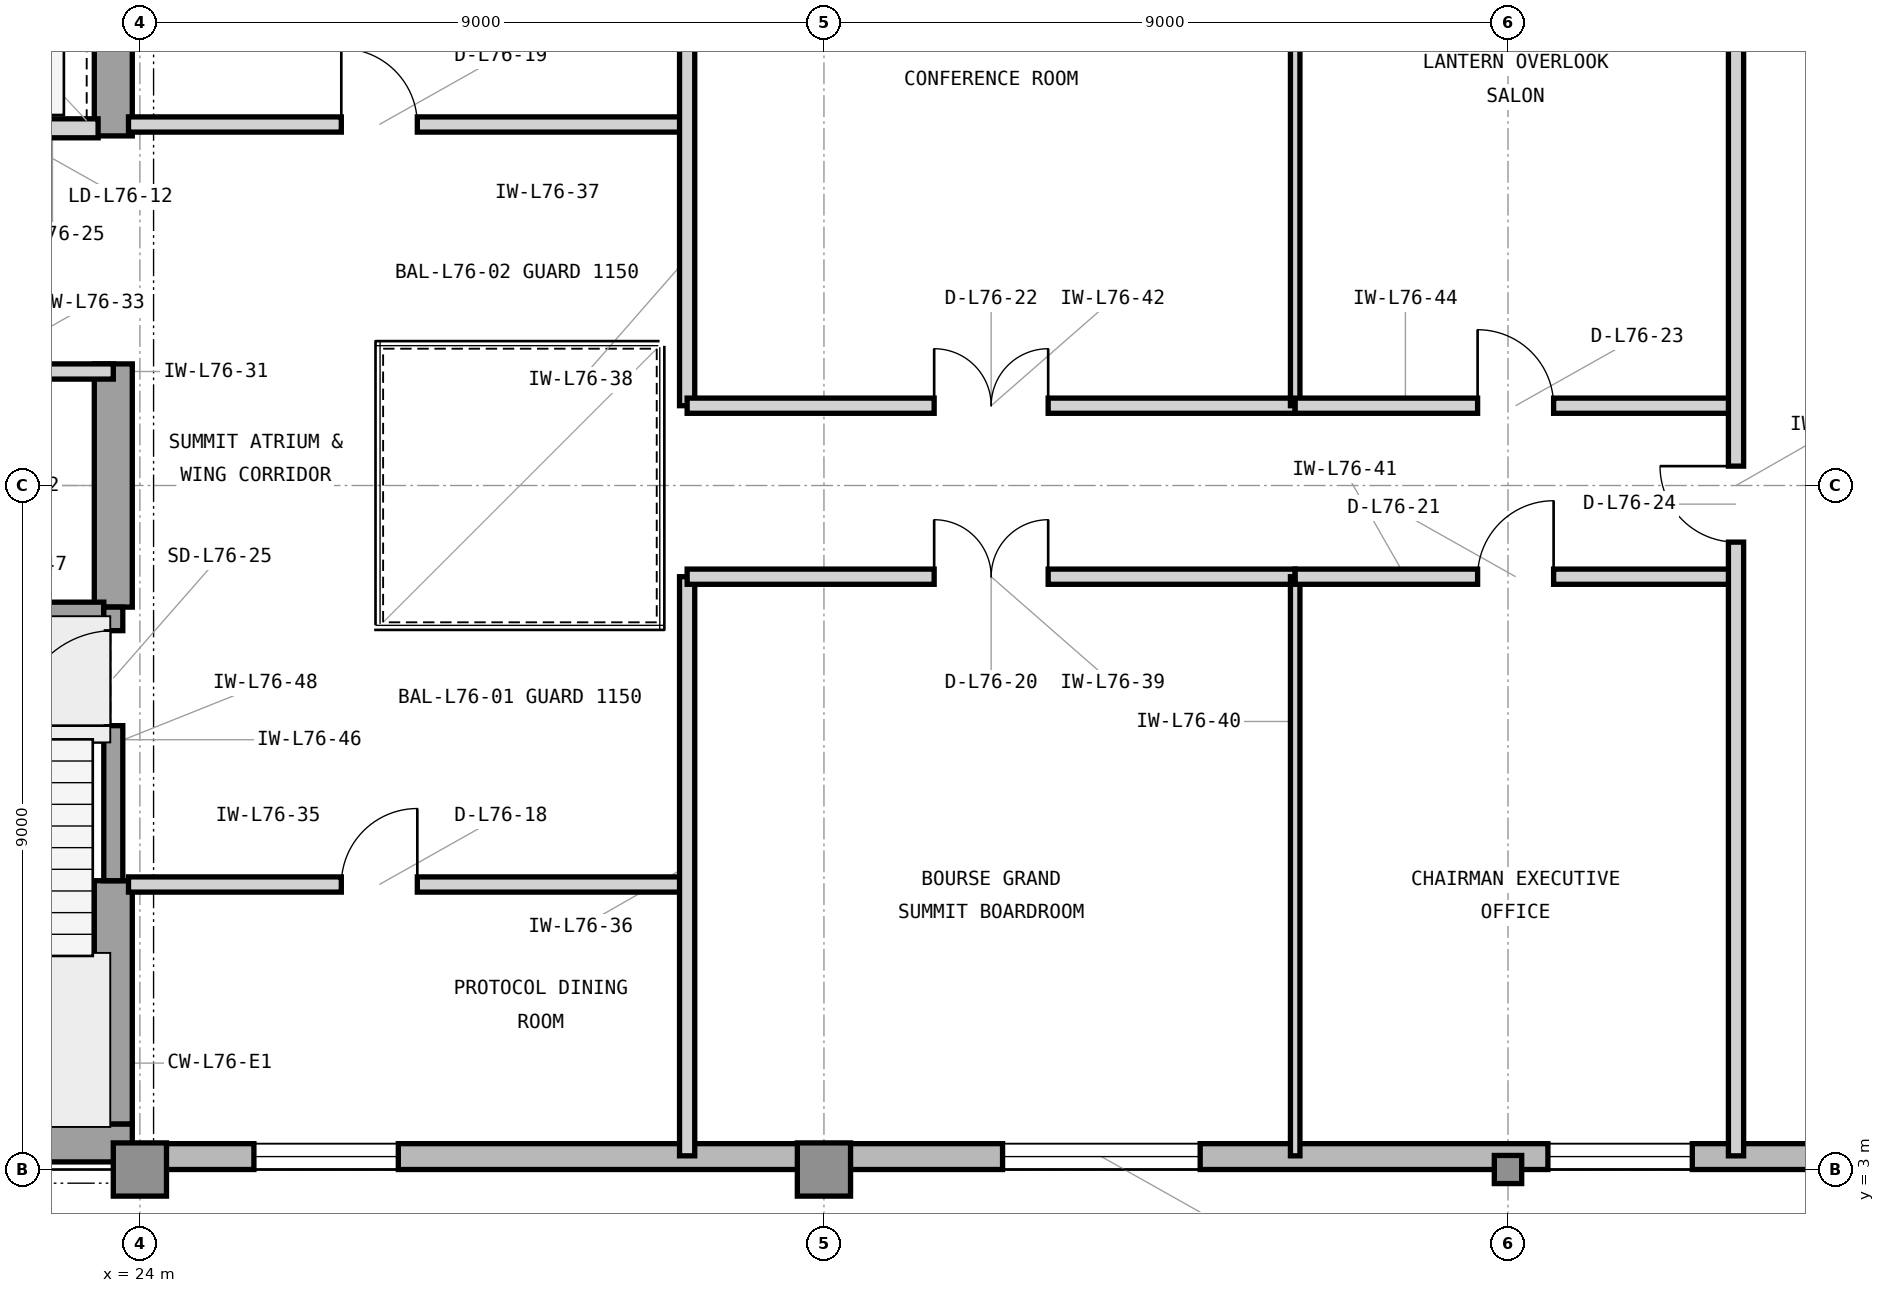
"""IFC4 building model, lengths in metres.
Left out: names, types, materials, properties, quantities, classifications, styles, units other than length and angle.
Written with IfcOpenShell. Run it as: python <this file> out.ifc"""

import sys

from ifc_helpers import new_model, si_unit, direction, frame, frame_2d, origin, origin_2d, place, context, subcontext, project, spatial, rectangle, i_section, extrude, element, fill, save


model = new_model("IFC4")
c1 = context("Model", 3, precision=1e-05, world=origin(), true_north=direction((0.0, 1.0)))
c2 = subcontext(c1, "Body", "Model", "MODEL_VIEW")
j1 = project(units=[si_unit("LENGTHUNIT", "METRE"), si_unit("PLANEANGLEUNIT", "RADIAN")], contexts=[c1])
p1 = place(None, origin())
s1 = spatial("IfcSite", under=j1, at=p1, CompositionType="ELEMENT")
p2 = place(p1, origin())
s2 = spatial("IfcBuilding", under=s1, at=p2, CompositionType="ELEMENT")
p3 = place(p2, frame((0.0, 0.0, 309.3)))
s3 = spatial("IfcBuildingStorey", under=s2, at=p3, CompositionType="ELEMENT", Elevation=309.3)
p4 = place(p3, frame((7.475, 3.35, 0.0), z_axis=(0.0, 0.0, 1.0), x_axis=(1.0, 0.0, 0.0)))
e1 = element("IfcWall", 1, at=p4, inside=s3, PredefinedType="SHEAR", context=c2, shape_type="SweptSolid", body=[
    extrude(rectangle(XDim=16.425, YDim=0.5, at=frame_2d((8.212, 0.0))), origin(), (0.0, 0.0, 1.0), 3.9),
])
p5 = place(p3, frame((23.65, 3.6, 0.0), z_axis=(0.0, 0.0, 1.0), x_axis=(0.0, 1.0, 0.0)))
e2 = element("IfcWall", 2, at=p5, inside=s3, PredefinedType="SHEAR", context=c2, shape_type="SweptSolid", body=[
    extrude(rectangle(XDim=3.2, YDim=0.5, at=frame_2d((1.6, 0.0))), origin(), (0.0, 0.0, 1.0), 3.9),
])
p6 = place(p3, frame((23.65, 10.4, 0.0), z_axis=(0.0, 0.0, 1.0), x_axis=(0.0, 1.0, 0.0)))
e3 = element("IfcWall", 3, at=p6, inside=s3, PredefinedType="SHEAR", context=c2, shape_type="SweptSolid", body=[
    extrude(rectangle(XDim=3.2, YDim=0.5, at=frame_2d((1.6, 0.0))), origin(), (0.0, 0.0, 1.0), 3.9),
])
p7 = place(p3, frame((23.65, 16.6, 0.0), z_axis=(0.0, 0.0, 1.0), x_axis=(0.0, 1.0, 0.0)))
e4 = element("IfcWall", 4, at=p7, inside=s3, PredefinedType="SHEAR", context=c2, shape_type="SweptSolid", body=[
    extrude(rectangle(XDim=4.05, YDim=0.5, at=frame_2d((2.025, 0.0))), origin(), (0.0, 0.0, 1.0), 3.9),
])
for number, where, z_axis, x_axis in (
    (5, (24.0, 3.0, 0.0), (0.0, 0.0, 1.0), (1.0, 0.0, 0.0)),
    (6, (33.0, 3.0, 0.0), (0.0, 0.0, 1.0), (1.0, 0.0, 0.0)),
):
    element("IfcColumn", number, at=place(p3, frame(where, z_axis=z_axis, x_axis=x_axis)), inside=s3, PredefinedType="COLUMN", context=c2, shape_type="SweptSolid", body=[
        extrude(rectangle(XDim=0.7, YDim=0.7, at=origin_2d()), origin(), (0.0, 0.0, 1.0), 3.9),
    ])
p8 = place(p3, frame((42.0, 3.0, 0.0), z_axis=(0.0, 0.0, 1.0), x_axis=(1.0, 0.0, 0.0)))
e7 = element("IfcColumn", 7, at=p8, inside=s3, PredefinedType="COLUMN", context=c2, shape_type="SweptSolid", body=[
    extrude(i_section(OverallWidth=0.37, OverallDepth=0.36, WebThickness=0.012, FlangeThickness=0.02, FilletRadius=0.016, at=origin_2d()), origin(), (0.0, 0.0, 1.0), 3.9),
])
p9 = place(p3, frame((23.9, 3.17, 0.0), z_axis=(0.0, 0.0, 1.0), x_axis=(1.0, 0.0, 0.0)))
e8 = element("IfcWall", 8, at=p9, inside=s3, PredefinedType="STANDARD", context=c2, shape_type="SweptSolid", body=[
    extrude(rectangle(XDim=25.5, YDim=0.34, at=frame_2d((12.75, 0.0))), origin(), (0.0, 0.0, 1.0), 3.62),
])
p10 = place(p9, frame((1.6, 0.0, 0.8)))
e9 = element("IfcOpeningElement", 9, at=p10, cuts=e8, PredefinedType="OPENING", context=c2, shape_type="SweptSolid", body=[
    extrude(rectangle(XDim=1.9, YDim=2.35, at=frame_2d((0.95, 1.175))), frame((0.0, 0.18, 0.0), z_axis=(0.0, -1.0, 0.0), x_axis=(1.0, 0.0, 0.0)), (0.0, 0.0, 1.0), 0.36),
])
p11 = place(p9, frame((11.45, 0.0, 0.8)))
e10 = element("IfcOpeningElement", 10, at=p11, cuts=e8, PredefinedType="OPENING", context=c2, shape_type="SweptSolid", body=[
    extrude(rectangle(XDim=2.6, YDim=2.35, at=frame_2d((1.3, 1.175))), frame((0.0, 0.18, 0.0), z_axis=(0.0, -1.0, 0.0), x_axis=(1.0, 0.0, 0.0)), (0.0, 0.0, 1.0), 0.36),
])
p12 = place(p9, frame((18.625, 0.0, 0.8)))
e11 = element("IfcOpeningElement", 11, at=p12, cuts=e8, PredefinedType="OPENING", context=c2, shape_type="SweptSolid", body=[
    extrude(rectangle(XDim=1.9, YDim=2.35, at=frame_2d((0.95, 1.175))), frame((0.0, 0.18, 0.0), z_axis=(0.0, -1.0, 0.0), x_axis=(1.0, 0.0, 0.0)), (0.0, 0.0, 1.0), 0.36),
])
p13 = place(p3, frame((21.05, 16.7, 0.0), z_axis=(0.0, 0.0, 1.0), x_axis=(1.0, 0.0, 0.0)))
e12 = element("IfcWall", 12, at=p13, inside=s3, PredefinedType="PARTITIONING", context=c2, shape_type="SweptSolid", body=[
    extrude(rectangle(XDim=2.4, YDim=0.25, at=frame_2d((1.2, 0.0))), origin(), (0.0, 0.0, 1.0), 3.203),
])
p14 = place(p13, frame((0.52, 0.0, 0.0)))
e13 = element("IfcOpeningElement", 13, at=p14, cuts=e12, PredefinedType="OPENING", context=c2, shape_type="SweptSolid", body=[
    extrude(rectangle(XDim=1.15, YDim=2.25, at=frame_2d((0.575, 1.125))), frame((0.0, 0.135, 0.0), z_axis=(0.0, -1.0, 0.0), x_axis=(1.0, 0.0, 0.0)), (0.0, 0.0, 1.0), 0.27),
])
p15 = place(p3, frame((19.9, 13.5, 0.0), z_axis=(0.0, 0.0, 1.0), x_axis=(1.0, 0.0, 0.0)))
e14 = element("IfcWall", 14, at=p15, inside=s3, PredefinedType="PARTITIONING", context=c2, shape_type="SweptSolid", body=[
    extrude(rectangle(XDim=3.75, YDim=0.2, at=frame_2d((1.875, 0.0))), origin(), (0.0, 0.0, 1.0), 3.203),
])
p16 = place(p15, frame((1.4, 0.0, 0.0)))
e15 = element("IfcOpeningElement", 15, at=p16, cuts=e14, PredefinedType="OPENING", context=c2, shape_type="SweptSolid", body=[
    extrude(rectangle(XDim=0.95, YDim=2.1, at=frame_2d((0.475, 1.05))), frame((0.0, 0.11, 0.0), z_axis=(0.0, -1.0, 0.0), x_axis=(1.0, 0.0, 0.0)), (0.0, 0.0, 1.0), 0.22),
])
p17 = place(p3, frame((23.85, 6.75, 0.0), z_axis=(0.0, 0.0, 1.0), x_axis=(1.0, 0.0, 0.0)))
e16 = element("IfcWall", 16, at=p17, inside=s3, PredefinedType="PARTITIONING", context=c2, shape_type="SweptSolid", body=[
    extrude(rectangle(XDim=7.35, YDim=0.2, at=frame_2d((3.675, 0.0))), origin(), (0.0, 0.0, 1.0), 3.61),
])
p18 = place(p17, frame((2.8, 0.0, 0.0)))
e17 = element("IfcOpeningElement", 17, at=p18, cuts=e16, PredefinedType="OPENING", context=c2, shape_type="SweptSolid", body=[
    extrude(rectangle(XDim=1.0, YDim=2.15, at=frame_2d((0.5, 1.075))), frame((0.0, 0.11, 0.0), z_axis=(0.0, -1.0, 0.0), x_axis=(1.0, 0.0, 0.0)), (0.0, 0.0, 1.0), 0.22),
])
p19 = place(p3, frame((31.2, 3.18, 0.0), z_axis=(0.0, 0.0, 1.0), x_axis=(0.0, 1.0, 0.0)))
e18 = element("IfcWall", 18, at=p19, inside=s3, PredefinedType="PARTITIONING", context=c2, shape_type="SweptSolid", body=[
    extrude(rectangle(XDim=7.62, YDim=0.2, at=frame_2d((3.81, 0.0))), origin(), (0.0, 0.0, 1.0), 3.61),
])
p20 = place(p3, frame((23.85, 16.75, 0.0), z_axis=(0.0, 0.0, 1.0), x_axis=(1.0, 0.0, 0.0)))
e19 = element("IfcWall", 19, at=p20, inside=s3, PredefinedType="PARTITIONING", context=c2, shape_type="SweptSolid", body=[
    extrude(rectangle(XDim=7.35, YDim=0.2, at=frame_2d((3.675, 0.0))), origin(), (0.0, 0.0, 1.0), 3.61),
])
p21 = place(p20, frame((2.8, 0.0, 0.0)))
e20 = element("IfcOpeningElement", 20, at=p21, cuts=e19, PredefinedType="OPENING", context=c2, shape_type="SweptSolid", body=[
    extrude(rectangle(XDim=1.0, YDim=2.15, at=frame_2d((0.5, 1.075))), frame((0.0, 0.11, 0.0), z_axis=(0.0, -1.0, 0.0), x_axis=(1.0, 0.0, 0.0)), (0.0, 0.0, 1.0), 0.22),
])
p22 = place(p3, frame((31.2, 13.05, 0.0), z_axis=(0.0, 0.0, 1.0), x_axis=(0.0, 1.0, 0.0)))
e21 = element("IfcWall", 21, at=p22, inside=s3, PredefinedType="PARTITIONING", context=c2, shape_type="SweptSolid", body=[
    extrude(rectangle(XDim=7.77, YDim=0.2, at=frame_2d((3.885, 0.0))), origin(), (0.0, 0.0, 1.0), 3.61),
])
p23 = place(p3, frame((31.2, 10.8, 0.0), z_axis=(0.0, 0.0, 1.0), x_axis=(1.0, 0.0, 0.0)))
e22 = element("IfcWall", 22, at=p23, inside=s3, PredefinedType="PARTITIONING", context=c2, shape_type="SweptSolid", body=[
    extrude(rectangle(XDim=8.0, YDim=0.2, at=frame_2d((4.0, 0.0))), origin(), (0.0, 0.0, 1.0), 3.61),
])
p24 = place(p23, frame((3.25, 0.0, 0.0)))
e23 = element("IfcOpeningElement", 23, at=p24, cuts=e22, PredefinedType="OPENING", context=c2, shape_type="SweptSolid", body=[
    extrude(rectangle(XDim=1.5, YDim=2.3, at=frame_2d((0.75, 1.15))), frame((0.0, 0.11, 0.0), z_axis=(0.0, -1.0, 0.0), x_axis=(1.0, 0.0, 0.0)), (0.0, 0.0, 1.0), 0.22),
])
p25 = place(p3, frame((39.2, 3.18, 0.0), z_axis=(0.0, 0.0, 1.0), x_axis=(0.0, 1.0, 0.0)))
e24 = element("IfcWall", 24, at=p25, inside=s3, PredefinedType="PARTITIONING", context=c2, shape_type="SweptSolid", body=[
    extrude(rectangle(XDim=7.62, YDim=0.125, at=frame_2d((3.81, 0.0))), origin(), (0.0, 0.0, 1.0), 3.61),
])
p26 = place(p3, frame((39.2, 10.8, 0.0), z_axis=(0.0, 0.0, 1.0), x_axis=(1.0, 0.0, 0.0)))
e25 = element("IfcWall", 25, at=p26, inside=s3, PredefinedType="PARTITIONING", context=c2, shape_type="SweptSolid", body=[
    extrude(rectangle(XDim=5.8, YDim=0.2, at=frame_2d((2.9, 0.0))), origin(), (0.0, 0.0, 1.0), 3.61),
])
p27 = place(p26, frame((2.4, 0.0, 0.0)))
e26 = element("IfcOpeningElement", 26, at=p27, cuts=e25, PredefinedType="OPENING", context=c2, shape_type="SweptSolid", body=[
    extrude(rectangle(XDim=1.0, YDim=2.15, at=frame_2d((0.5, 1.075))), frame((0.0, 0.11, 0.0), z_axis=(0.0, -1.0, 0.0), x_axis=(1.0, 0.0, 0.0)), (0.0, 0.0, 1.0), 0.22),
])
p28 = place(p3, frame((31.2, 13.05, 0.0), z_axis=(0.0, 0.0, 1.0), x_axis=(1.0, 0.0, 0.0)))
e27 = element("IfcWall", 27, at=p28, inside=s3, PredefinedType="PARTITIONING", context=c2, shape_type="SweptSolid", body=[
    extrude(rectangle(XDim=8.0, YDim=0.2, at=frame_2d((4.0, 0.0))), origin(), (0.0, 0.0, 1.0), 3.61),
])
p29 = place(p28, frame((3.25, 0.0, 0.0)))
e28 = element("IfcOpeningElement", 28, at=p29, cuts=e27, PredefinedType="OPENING", context=c2, shape_type="SweptSolid", body=[
    extrude(rectangle(XDim=1.5, YDim=2.3, at=frame_2d((0.75, 1.15))), frame((0.0, 0.11, 0.0), z_axis=(0.0, -1.0, 0.0), x_axis=(1.0, 0.0, 0.0)), (0.0, 0.0, 1.0), 0.22),
])
p30 = place(p3, frame((39.2, 13.05, 0.0), z_axis=(0.0, 0.0, 1.0), x_axis=(0.0, 1.0, 0.0)))
e29 = element("IfcWall", 29, at=p30, inside=s3, PredefinedType="PARTITIONING", context=c2, shape_type="SweptSolid", body=[
    extrude(rectangle(XDim=7.77, YDim=0.125, at=frame_2d((3.885, 0.0))), origin(), (0.0, 0.0, 1.0), 3.61),
])
p31 = place(p3, frame((39.2, 13.05, 0.0), z_axis=(0.0, 0.0, 1.0), x_axis=(1.0, 0.0, 0.0)))
e30 = element("IfcWall", 30, at=p31, inside=s3, PredefinedType="PARTITIONING", context=c2, shape_type="SweptSolid", body=[
    extrude(rectangle(XDim=5.8, YDim=0.2, at=frame_2d((2.9, 0.0))), origin(), (0.0, 0.0, 1.0), 3.61),
])
p32 = place(p31, frame((2.4, 0.0, 0.0)))
e31 = element("IfcOpeningElement", 31, at=p32, cuts=e30, PredefinedType="OPENING", context=c2, shape_type="SweptSolid", body=[
    extrude(rectangle(XDim=1.0, YDim=2.15, at=frame_2d((0.5, 1.075))), frame((0.0, 0.11, 0.0), z_axis=(0.0, -1.0, 0.0), x_axis=(1.0, 0.0, 0.0)), (0.0, 0.0, 1.0), 0.22),
])
p33 = place(p3, frame((45.0, 3.18, 0.0), z_axis=(0.0, 0.0, 1.0), x_axis=(0.0, 1.0, 0.0)))
e32 = element("IfcWall", 32, at=p33, inside=s3, PredefinedType="PARTITIONING", context=c2, shape_type="SweptSolid", body=[
    extrude(rectangle(XDim=17.64, YDim=0.2, at=frame_2d((8.82, 0.0))), origin(), (0.0, 0.0, 1.0), 3.61),
])
p34 = place(p33, frame((8.075, 0.0, 0.0)))
e33 = element("IfcOpeningElement", 33, at=p34, cuts=e32, PredefinedType="OPENING", context=c2, shape_type="SweptSolid", body=[
    extrude(rectangle(XDim=1.0, YDim=2.15, at=frame_2d((0.5, 1.075))), frame((0.0, 0.11, 0.0), z_axis=(0.0, -1.0, 0.0), x_axis=(1.0, 0.0, 0.0)), (0.0, 0.0, 1.0), 0.22),
])
p35 = place(p3, frame((19.705, 10.34, 0.0), z_axis=(0.0, 0.0, 1.0), x_axis=(1.0, 0.0, 0.0)))
e34 = element("IfcWall", 34, at=p35, inside=s3, PredefinedType="SHEAR", context=c2, shape_type="SweptSolid", body=[
    extrude(rectangle(XDim=3.82, YDim=0.25, at=frame_2d((1.91, 0.0))), origin(), (0.0, 0.0, 1.0), 3.9),
])
p36 = place(p3, frame((23.65, 6.8, 0.0), z_axis=(0.0, 0.0, 1.0), x_axis=(0.0, 1.0, 0.0)))
e35 = element("IfcWall", 35, at=p36, inside=s3, PredefinedType="SHEAR", context=c2, shape_type="SweptSolid", body=[
    extrude(rectangle(XDim=3.6, YDim=0.25, at=frame_2d((1.8, 0.0))), origin(), (0.0, 0.0, 1.0), 3.9),
])
p37 = place(p36, frame((2.04, 0.0, 0.0)))
e36 = element("IfcOpeningElement", 36, at=p37, cuts=e35, PredefinedType="OPENING", context=c2, shape_type="SweptSolid", body=[
    extrude(rectangle(XDim=1.25, YDim=2.2, at=frame_2d((0.625, 1.1))), frame((0.0, 0.135, 0.0), z_axis=(0.0, -1.0, 0.0), x_axis=(1.0, 0.0, 0.0)), (0.0, 0.0, 1.0), 0.27),
])
p38 = place(p10, origin())
e37 = element("IfcWindow", 37, at=p38, inside=s3, PartitioningType="SINGLE_PANEL", PredefinedType="WINDOW", context=c2, shape_type="SweptSolid", body=[
    extrude(rectangle(XDim=1.9, YDim=2.35, at=frame_2d((0.95, 1.175))), frame((0.0, 0.11, 0.0), z_axis=(0.0, -1.0, 0.0), x_axis=(1.0, 0.0, 0.0)), (0.0, 0.0, 1.0), 0.06),
])
fill(e9, e37)
p39 = place(p11, origin())
e38 = element("IfcWindow", 38, at=p39, inside=s3, PartitioningType="SINGLE_PANEL", PredefinedType="WINDOW", context=c2, shape_type="SweptSolid", body=[
    extrude(rectangle(XDim=2.6, YDim=2.35, at=frame_2d((1.3, 1.175))), frame((0.0, 0.11, 0.0), z_axis=(0.0, -1.0, 0.0), x_axis=(1.0, 0.0, 0.0)), (0.0, 0.0, 1.0), 0.06),
])
fill(e10, e38)
p40 = place(p18, origin())
e39 = element("IfcDoor", 39, at=p40, inside=s3, OperationType="SINGLE_SWING_RIGHT", PredefinedType="DOOR", context=c2, shape_type="SweptSolid", body=[
    extrude(rectangle(XDim=1.0, YDim=2.15, at=frame_2d((0.5, 1.075))), frame((0.0, 0.025, 0.0), z_axis=(0.0, -1.0, 0.0), x_axis=(1.0, 0.0, 0.0)), (0.0, 0.0, 1.0), 0.05),
])
fill(e17, e39)
p41 = place(p21, origin())
e40 = element("IfcDoor", 40, at=p41, inside=s3, OperationType="SINGLE_SWING_LEFT", PredefinedType="DOOR", context=c2, shape_type="SweptSolid", body=[
    extrude(rectangle(XDim=1.0, YDim=2.15, at=frame_2d((0.5, 1.075))), frame((0.0, 0.025, 0.0), z_axis=(0.0, -1.0, 0.0), x_axis=(1.0, 0.0, 0.0)), (0.0, 0.0, 1.0), 0.05),
])
fill(e20, e40)
p42 = place(p24, origin())
e41 = element("IfcDoor", 41, at=p42, inside=s3, OperationType="DOUBLE_DOOR_SINGLE_SWING", PredefinedType="DOOR", context=c2, shape_type="SweptSolid", body=[
    extrude(rectangle(XDim=1.5, YDim=2.3, at=frame_2d((0.75, 1.15))), frame((0.0, 0.025, 0.0), z_axis=(0.0, -1.0, 0.0), x_axis=(1.0, 0.0, 0.0)), (0.0, 0.0, 1.0), 0.05),
])
fill(e23, e41)
p43 = place(p27, origin())
e42 = element("IfcDoor", 42, at=p43, inside=s3, OperationType="SINGLE_SWING_RIGHT", PredefinedType="DOOR", context=c2, shape_type="SweptSolid", body=[
    extrude(rectangle(XDim=1.0, YDim=2.15, at=frame_2d((0.5, 1.075))), frame((0.0, 0.025, 0.0), z_axis=(0.0, -1.0, 0.0), x_axis=(1.0, 0.0, 0.0)), (0.0, 0.0, 1.0), 0.05),
])
fill(e26, e42)
p44 = place(p29, origin())
e43 = element("IfcDoor", 43, at=p44, inside=s3, OperationType="DOUBLE_DOOR_SINGLE_SWING", PredefinedType="DOOR", context=c2, shape_type="SweptSolid", body=[
    extrude(rectangle(XDim=1.5, YDim=2.3, at=frame_2d((0.75, 1.15))), frame((0.0, 0.025, 0.0), z_axis=(0.0, -1.0, 0.0), x_axis=(1.0, 0.0, 0.0)), (0.0, 0.0, 1.0), 0.05),
])
fill(e28, e43)
p45 = place(p32, origin())
e44 = element("IfcDoor", 44, at=p45, inside=s3, OperationType="SINGLE_SWING_LEFT", PredefinedType="DOOR", context=c2, shape_type="SweptSolid", body=[
    extrude(rectangle(XDim=1.0, YDim=2.15, at=frame_2d((0.5, 1.075))), frame((0.0, 0.025, 0.0), z_axis=(0.0, -1.0, 0.0), x_axis=(1.0, 0.0, 0.0)), (0.0, 0.0, 1.0), 0.05),
])
fill(e31, e44)
p46 = place(p34, origin())
e45 = element("IfcDoor", 45, at=p46, inside=s3, OperationType="SINGLE_SWING_RIGHT", PredefinedType="DOOR", context=c2, shape_type="SweptSolid", body=[
    extrude(rectangle(XDim=1.0, YDim=2.15, at=frame_2d((0.5, 1.075))), frame((0.0, 0.025, 0.0), z_axis=(0.0, -1.0, 0.0), x_axis=(1.0, 0.0, 0.0)), (0.0, 0.0, 1.0), 0.05),
])
fill(e33, e45)
p47 = place(p37, origin())
e46 = element("IfcDoor", 46, at=p47, inside=s3, OperationType="SINGLE_SWING_LEFT", PredefinedType="DOOR", context=c2, shape_type="SweptSolid", body=[
    extrude(rectangle(XDim=1.25, YDim=2.2, at=frame_2d((0.625, 1.1))), frame((0.0, 0.025, 0.0), z_axis=(0.0, -1.0, 0.0), x_axis=(1.0, 0.0, 0.0)), (0.0, 0.0, 1.0), 0.05),
])
fill(e36, e46)
p48 = place(p12, origin())
e47 = element("IfcWindow", 47, at=p48, inside=s3, PartitioningType="SINGLE_PANEL", PredefinedType="WINDOW", context=c2, shape_type="SweptSolid", body=[
    extrude(rectangle(XDim=1.9, YDim=2.35, at=frame_2d((0.95, 1.175))), frame((0.0, 0.11, 0.0), z_axis=(0.0, -1.0, 0.0), x_axis=(1.0, 0.0, 0.0)), (0.0, 0.0, 1.0), 0.06),
])
fill(e11, e47)
save(model, sys.argv[1])
